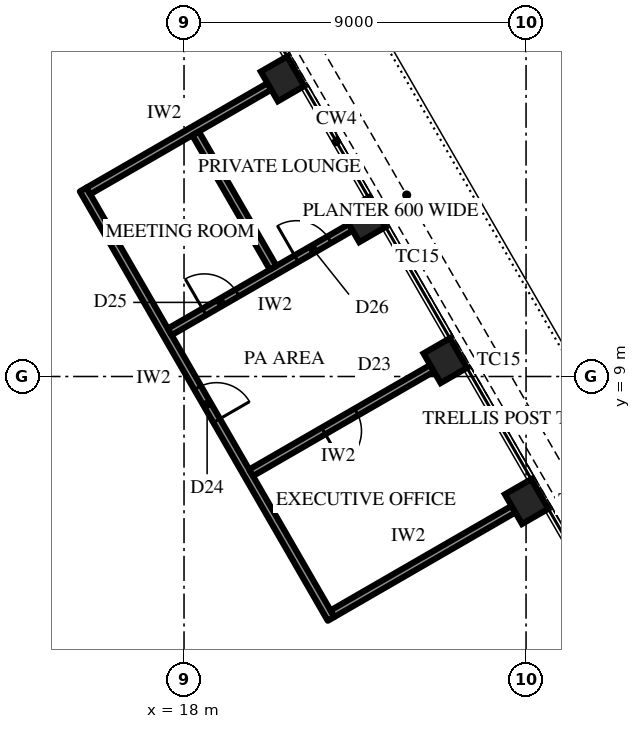
"""IFC4 building model, lengths in metres.
Left out: names, types, materials, properties, quantities, classifications, styles, units other than length and angle.
Written with IfcOpenShell. Run it as: python <this file> out.ifc"""

import sys

from ifc_helpers import new_model, si_unit, direction, frame, frame_2d, origin, origin_2d, place, context, subcontext, project, spatial, rectangle, extrude, element, fill, save


model = new_model("IFC4")
c1 = context("Model", 3, precision=1e-05, world=origin(), true_north=direction((0.0, 1.0)))
c2 = subcontext(c1, "Body", "Model", "MODEL_VIEW")
j1 = project(units=[si_unit("LENGTHUNIT", "METRE"), si_unit("PLANEANGLEUNIT", "RADIAN")], contexts=[c1])
p1 = place(None, origin())
s1 = spatial("IfcSite", under=j1, at=p1, CompositionType="ELEMENT")
p2 = place(p1, origin())
s2 = spatial("IfcBuilding", under=s1, at=p2, CompositionType="ELEMENT")
p3 = place(p2, frame((0.0, 0.0, 366.1)))
s3 = spatial("IfcBuildingStorey", under=s2, at=p3, CompositionType="ELEMENT", Elevation=366.1)
for number, where, z_axis, x_axis in (
    (1, (27.015, 5.708, 0.0), (0.0, 0.0, 1.0), (-0.5, 0.866, 0.0)),
    (2, (24.874, 9.417, 0.0), (0.0, 0.0, 1.0), (-0.5, 0.866, 0.0)),
    (3, (22.733, 13.125, 0.0), (0.0, 0.0, 1.0), (-0.5, 0.866, 0.0)),
    (4, (20.592, 16.833, 0.0), (0.0, 0.0, 1.0), (-0.5, 0.866, 0.0)),
):
    element("IfcColumn", number, at=place(p3, frame(where, z_axis=z_axis, x_axis=x_axis)), inside=s3, PredefinedType="COLUMN", context=c2, shape_type="SweptSolid", body=[
        extrude(rectangle(XDim=0.9, YDim=0.8, at=origin_2d()), origin(), (0.0, 0.0, 1.0), 4.2),
    ])
p4 = place(p3, frame((21.869, 2.622, 0.0), z_axis=(0.0, 0.0, 1.0), x_axis=(-0.500013496215, 0.866017611601, 0.0)))
e5 = element("IfcWall", 5, at=p4, inside=s3, PredefinedType="PARTITIONING", context=c2, shape_type="SweptSolid", body=[
    extrude(rectangle(XDim=13.046, YDim=0.2, at=frame_2d((6.523, 0.0))), origin(), (0.0, 0.0, 1.0), 4.0),
])
p5 = place(p4, frame((6.023, 0.0, 0.0)))
e6 = element("IfcOpeningElement", 6, at=p5, cuts=e5, PredefinedType="OPENING", context=c2, shape_type="SweptSolid", body=[
    extrude(rectangle(XDim=1.0, YDim=2.2, at=frame_2d((0.5, 1.1))), frame((0.0, 0.11, 0.0), z_axis=(0.0, -1.0, 0.0), x_axis=(1.0, 0.0, 0.0)), (0.0, 0.0, 1.0), 0.22),
])
p6 = place(p3, frame((21.906, 2.758, 0.0), z_axis=(0.0, 0.0, 1.0), x_axis=(0.866027397988, 0.499996545922, 0.0)))
e7 = element("IfcWall", 7, at=p6, inside=s3, PredefinedType="PARTITIONING", context=c2, shape_type="SweptSolid", body=[
    extrude(rectangle(XDim=5.5, YDim=0.2, at=frame_2d((2.75, 0.0))), origin(), (0.0, 0.0, 1.0), 3.082),
])
p7 = place(p3, frame((19.765, 6.467, 0.0), z_axis=(0.0, 0.0, 1.0), x_axis=(0.866027397988, 0.499996545922, 0.0)))
e8 = element("IfcWall", 8, at=p7, inside=s3, PredefinedType="PARTITIONING", context=c2, shape_type="SweptSolid", body=[
    extrude(rectangle(XDim=5.5, YDim=0.2, at=frame_2d((2.75, 0.0))), origin(), (0.0, 0.0, 1.0), 2.992),
])
p8 = place(p7, frame((2.2, 0.0, 0.0)))
e9 = element("IfcOpeningElement", 9, at=p8, cuts=e8, PredefinedType="OPENING", context=c2, shape_type="SweptSolid", body=[
    extrude(rectangle(XDim=1.0, YDim=2.2, at=frame_2d((0.5, 1.1))), frame((0.0, 0.11, 0.0), z_axis=(0.0, -1.0, 0.0), x_axis=(1.0, 0.0, 0.0)), (0.0, 0.0, 1.0), 0.22),
])
p9 = place(p3, frame((17.624, 10.175, 0.0), z_axis=(0.0, 0.0, 1.0), x_axis=(0.866027397988, 0.499996545922, 0.0)))
e10 = element("IfcWall", 10, at=p9, inside=s3, PredefinedType="PARTITIONING", context=c2, shape_type="SweptSolid", body=[
    extrude(rectangle(XDim=5.5, YDim=0.2, at=frame_2d((2.75, 0.0))), origin(), (0.0, 0.0, 1.0), 3.082),
])
p10 = place(p9, frame((1.05, 0.0, 0.0)))
e11 = element("IfcOpeningElement", 11, at=p10, cuts=e10, PredefinedType="OPENING", context=c2, shape_type="SweptSolid", body=[
    extrude(rectangle(XDim=1.0, YDim=2.2, at=frame_2d((0.5, 1.1))), frame((0.0, 0.11, 0.0), z_axis=(0.0, -1.0, 0.0), x_axis=(1.0, 0.0, 0.0)), (0.0, 0.0, 1.0), 0.22),
])
p11 = place(p9, frame((3.85, 0.0, 0.0)))
e12 = element("IfcOpeningElement", 12, at=p11, cuts=e10, PredefinedType="OPENING", context=c2, shape_type="SweptSolid", body=[
    extrude(rectangle(XDim=1.0, YDim=2.2, at=frame_2d((0.5, 1.1))), frame((0.0, 0.11, 0.0), z_axis=(0.0, -1.0, 0.0), x_axis=(1.0, 0.0, 0.0)), (0.0, 0.0, 1.0), 0.22),
])
p12 = place(p3, frame((15.483, 13.883, 0.0), z_axis=(0.0, 0.0, 1.0), x_axis=(0.866027397988, 0.499996545922, 0.0)))
e13 = element("IfcWall", 13, at=p12, inside=s3, PredefinedType="PARTITIONING", context=c2, shape_type="SweptSolid", body=[
    extrude(rectangle(XDim=5.5, YDim=0.2, at=frame_2d((2.75, 0.0))), origin(), (0.0, 0.0, 1.0), 3.082),
])
p13 = place(p3, frame((20.345, 11.862, 0.0), z_axis=(0.0, 0.0, 1.0), x_axis=(-0.499998569178, 0.866026229868, 0.0)))
e14 = element("IfcWall", 14, at=p13, inside=s3, PredefinedType="PARTITIONING", context=c2, shape_type="SweptSolid", body=[
    extrude(rectangle(XDim=4.082, YDim=0.2, at=frame_2d((2.041, 0.0))), origin(), (0.0, 0.0, 1.0), 4.0),
])
p14 = place(p8, frame((1.0, 0.0, 0.0), z_axis=(0.0, 0.0, 1.0), x_axis=(-1.0, 0.0, 0.0)))
e15 = element("IfcDoor", 15, at=p14, inside=s3, OperationType="SINGLE_SWING_LEFT", PredefinedType="DOOR", context=c2, shape_type="SweptSolid", body=[
    extrude(rectangle(XDim=1.0, YDim=2.2, at=frame_2d((0.5, 1.1))), frame((0.0, 0.025, 0.0), z_axis=(0.0, -1.0, 0.0), x_axis=(1.0, 0.0, 0.0)), (0.0, 0.0, 1.0), 0.05),
])
fill(e9, e15)
p15 = place(p5, frame((1.0, 0.0, 0.0), z_axis=(0.0, 0.0, 1.0), x_axis=(-1.0, 0.0, 0.0)))
e16 = element("IfcDoor", 16, at=p15, inside=s3, OperationType="SINGLE_SWING_LEFT", PredefinedType="DOOR", context=c2, shape_type="SweptSolid", body=[
    extrude(rectangle(XDim=1.0, YDim=2.2, at=frame_2d((0.5, 1.1))), frame((0.0, 0.025, 0.0), z_axis=(0.0, -1.0, 0.0), x_axis=(1.0, 0.0, 0.0)), (0.0, 0.0, 1.0), 0.05),
])
fill(e6, e16)
p16 = place(p10, origin())
e17 = element("IfcDoor", 17, at=p16, inside=s3, OperationType="SINGLE_SWING_RIGHT", PredefinedType="DOOR", context=c2, shape_type="SweptSolid", body=[
    extrude(rectangle(XDim=1.0, YDim=2.2, at=frame_2d((0.5, 1.1))), frame((0.0, 0.025, 0.0), z_axis=(0.0, -1.0, 0.0), x_axis=(1.0, 0.0, 0.0)), (0.0, 0.0, 1.0), 0.05),
])
fill(e11, e17)
p17 = place(p11, origin())
e18 = element("IfcDoor", 18, at=p17, inside=s3, OperationType="SINGLE_SWING_RIGHT", PredefinedType="DOOR", context=c2, shape_type="SweptSolid", body=[
    extrude(rectangle(XDim=1.0, YDim=2.2, at=frame_2d((0.5, 1.1))), frame((0.0, 0.025, 0.0), z_axis=(0.0, -1.0, 0.0), x_axis=(1.0, 0.0, 0.0)), (0.0, 0.0, 1.0), 0.05),
])
fill(e12, e18)
save(model, sys.argv[1])
